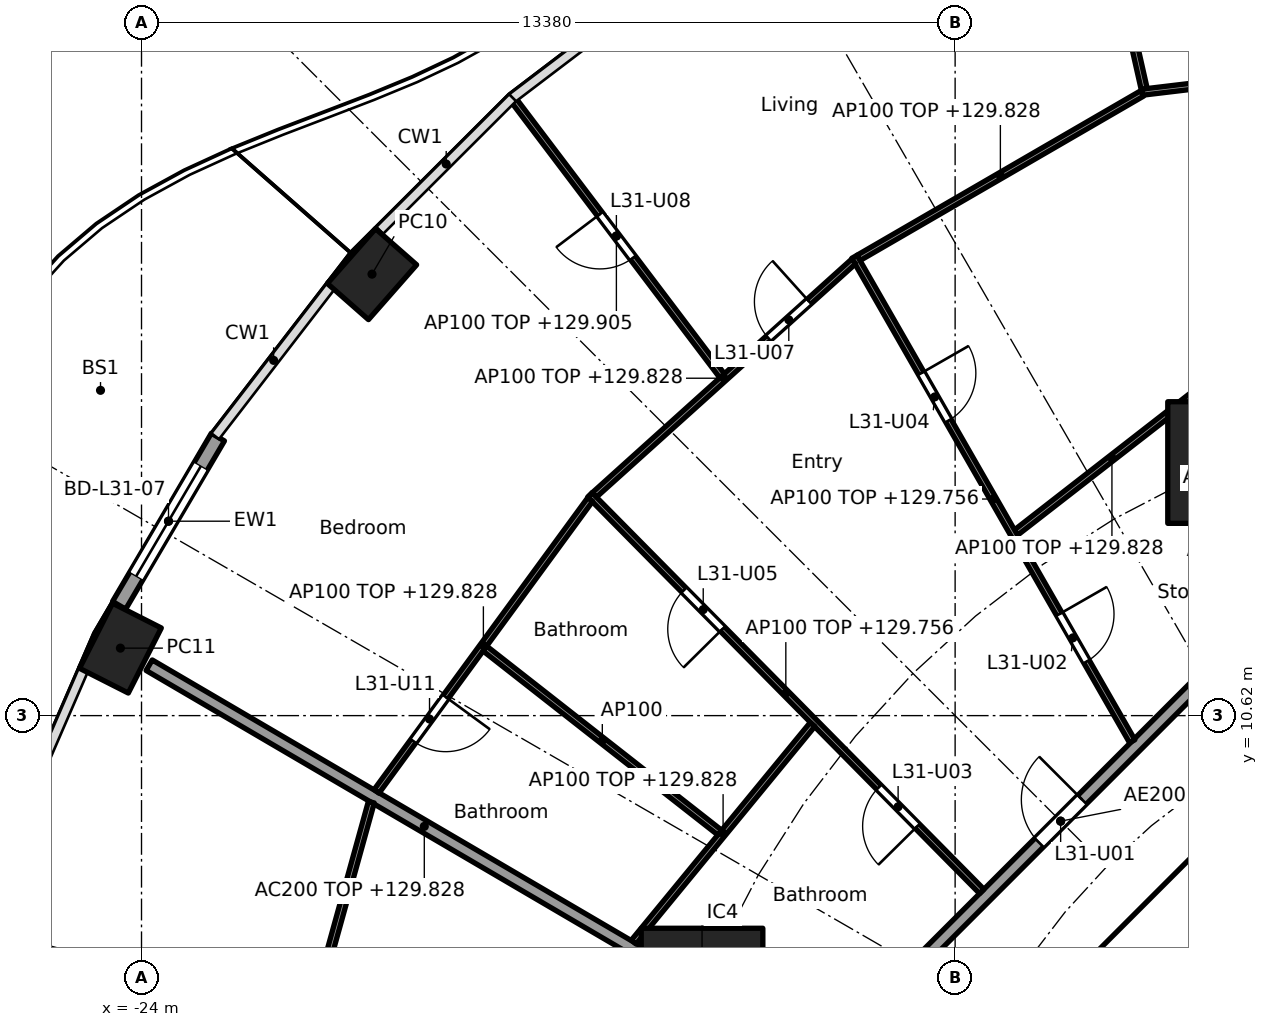
"""IFC4 building model, lengths in metres.
Left out: names, types, materials, properties, quantities, classifications, styles, units other than length and angle.
Written with IfcOpenShell. Run it as: python <this file> out.ifc"""

import sys

from ifc_helpers import new_model, si_unit, direction, frame, frame_2d, origin, origin_2d, place, context, subcontext, project, spatial, rectangle, hollow_rectangle, extrude, element, fill, save


model = new_model("IFC4")
c1 = context("Model", 3, precision=1e-05, world=origin(), true_north=direction((0.0, 1.0)))
c2 = subcontext(c1, "Body", "Model", "MODEL_VIEW")
j1 = project(units=[si_unit("LENGTHUNIT", "METRE"), si_unit("PLANEANGLEUNIT", "RADIAN")], contexts=[c1])
p1 = place(None, origin())
s1 = spatial("IfcSite", under=j1, at=p1, CompositionType="ELEMENT")
p2 = place(p1, origin())
s2 = spatial("IfcBuilding", under=s1, at=p2, CompositionType="ELEMENT")
p3 = place(p2, frame((0.0, 0.0, 127.0)))
s3 = spatial("IfcBuildingStorey", under=s2, at=p3, CompositionType="ELEMENT", Elevation=127.0)
for number, where, z_axis, x_axis in (
    (1, (-20.209, 17.88, 0.0), (0.0, 0.0, 1.0), (-0.66, -0.751, 0.0)),
    (2, (-24.347, 11.73, 0.0), (0.0, 0.0, 1.0), (-0.452, -0.892, 0.0)),
):
    element("IfcColumn", number, at=place(p3, frame(where, z_axis=z_axis, x_axis=x_axis)), inside=s3, PredefinedType="COLUMN", context=c2, shape_type="SweptSolid", body=[
        extrude(hollow_rectangle(XDim=1.2, YDim=0.9, WallThickness=0.04, at=origin_2d()), origin(), (0.0, 0.0, 1.0), 3.7),
    ])
for number, where, z_axis, x_axis in (
    (3, (-6.123, 14.782, 0.0), (0.0, 0.0, 1.0), (1.0, 0.0, 0.0)),
    (4, (-14.782, 6.123, 0.0), (0.0, 0.0, 1.0), (1.0, 0.0, 0.0)),
):
    element("IfcColumn", number, at=place(p3, frame(where, z_axis=z_axis, x_axis=x_axis)), inside=s3, PredefinedType="COLUMN", context=c2, shape_type="SweptSolid", body=[
        extrude(rectangle(XDim=2.0, YDim=2.0, at=origin_2d()), origin(), (0.0, 0.0, 1.0), 3.7),
    ])
p4 = place(p3, frame((-24.368, 12.434, 0.0), z_axis=(0.0, 0.0, 1.0), x_axis=(0.506314982873, 0.862348617508, 0.0)))
e5 = element("IfcWall", 5, at=p4, inside=s3, PredefinedType="SOLIDWALL", context=c2, shape_type="SweptSolid", body=[
    extrude(rectangle(XDim=3.208, YDim=0.25, at=frame_2d((1.604, 0.0))), origin(), (0.0, 0.0, 1.0), 3.44),
])
p5 = place(p4, frame((0.554, 0.0, 0.0)))
e6 = element("IfcOpeningElement", 6, at=p5, cuts=e5, PredefinedType="OPENING", context=c2, shape_type="SweptSolid", body=[
    extrude(rectangle(XDim=2.1, YDim=2.4, at=frame_2d((1.05, 1.2))), frame((0.0, 0.135, 0.0), z_axis=(0.0, -1.0, 0.0), x_axis=(1.0, 0.0, 0.0)), (0.0, 0.0, 1.0), 0.27),
])
p6 = place(p3, frame((-4.613, 9.988, 0.0), z_axis=(0.0, 0.0, 1.0), x_axis=(-0.707106781187, -0.707106781187, 0.0)))
e7 = element("IfcWall", 7, at=p6, inside=s3, PredefinedType="SHEAR", context=c2, shape_type="SweptSolid", body=[
    extrude(rectangle(XDim=7.602, YDim=0.6, at=frame_2d((3.801, 0.0))), origin(), (0.0, 0.0, 1.0), 3.44),
])
p7 = place(p6, frame((0.351, 0.0, 0.0)))
e8 = element("IfcOpeningElement", 8, at=p7, cuts=e7, PredefinedType="OPENING", context=c2, shape_type="SweptSolid", body=[
    extrude(rectangle(XDim=1.1, YDim=2.1, at=frame_2d((0.55, 1.05))), frame((0.0, 0.31, 0.0), z_axis=(0.0, -1.0, 0.0), x_axis=(1.0, 0.0, 0.0)), (0.0, 0.0, 1.0), 0.62),
])
p8 = place(p3, frame((-14.825, 6.148, 0.0), z_axis=(0.0, 0.0, 1.0), x_axis=(-0.862852031662, 0.505456597006, 0.0)))
e9 = element("IfcWall", 9, at=p8, inside=s3, PredefinedType="PARTITIONING", context=c2, shape_type="SweptSolid", body=[
    extrude(rectangle(XDim=10.487, YDim=0.2, at=frame_2d((5.244, 0.0))), origin(), (0.0, 0.0, 1.0), 2.828),
])
p9 = place(p3, frame((-5.275, 12.494, 0.0), z_axis=(0.0, 0.0, 1.0), x_axis=(-0.707106781187, -0.707106781187, 0.0)))
e10 = element("IfcWall", 10, at=p9, inside=s3, PredefinedType="PARTITIONING", context=c2, shape_type="SweptSolid", body=[
    extrude(rectangle(XDim=10.209, YDim=0.2, at=frame_2d((5.104, 0.0))), origin(), (0.0, 0.0, 1.0), 3.44),
])
p10 = place(p9, frame((4.604, 0.0, 0.0)))
e11 = element("IfcOpeningElement", 11, at=p10, cuts=e10, PredefinedType="OPENING", context=c2, shape_type="SweptSolid", body=[
    extrude(rectangle(XDim=1.0, YDim=2.1, at=frame_2d((0.5, 1.05))), frame((0.0, 0.11, 0.0), z_axis=(0.0, -1.0, 0.0), x_axis=(1.0, 0.0, 0.0)), (0.0, 0.0, 1.0), 0.22),
])
p11 = place(p3, frame((-1.825, 21.557, 0.0), z_axis=(0.0, 0.0, 1.0), x_axis=(-0.992915657947, -0.118821278412, 0.0)))
e12 = element("IfcWall", 12, at=p11, inside=s3, PredefinedType="PARTITIONING", context=c2, shape_type="SweptSolid", body=[
    extrude(rectangle(XDim=5.765, YDim=0.1, at=frame_2d((2.883, 0.0))), origin(), (0.0, 0.0, 1.0), 2.828),
])
p12 = place(p11, frame((2.408, 0.0, 0.0)))
e13 = element("IfcOpeningElement", 13, at=p12, cuts=e12, PredefinedType="OPENING", context=c2, shape_type="SweptSolid", body=[
    extrude(rectangle(XDim=0.9, YDim=2.1, at=frame_2d((0.45, 1.05))), frame((0.0, 0.06, 0.0), z_axis=(0.0, -1.0, 0.0), x_axis=(1.0, 0.0, 0.0)), (0.0, 0.0, 1.0), 0.12),
])
p13 = place(p3, frame((-6.463, 16.084, 0.0), z_axis=(0.0, 0.0, 1.0), x_axis=(-0.789457442969, -0.613805299538, 0.0)))
e14 = element("IfcWall", 14, at=p13, inside=s3, PredefinedType="PARTITIONING", context=c2, shape_type="SweptSolid", body=[
    extrude(rectangle(XDim=3.997, YDim=0.1, at=frame_2d((1.999, 0.0))), origin(), (0.0, 0.0, 1.0), 2.828),
])
p14 = place(p3, frame((-7.511, 20.927, 0.0), z_axis=(0.0, 0.0, 1.0), x_axis=(-0.220337559031, 0.975423682345, 0.0)))
e15 = element("IfcWall", 15, at=p14, inside=s3, PredefinedType="PARTITIONING", context=c2, shape_type="SweptSolid", body=[
    extrude(rectangle(XDim=4.202, YDim=0.1, at=frame_2d((2.101, 0.0))), origin(), (0.0, 0.0, 1.0), 2.828),
])
p15 = place(p3, frame((-7.543, 20.853, 0.0), z_axis=(0.0, 0.0, 1.0), x_axis=(-0.865086194899, -0.501623240485, 0.0)))
e16 = element("IfcWall", 16, at=p15, inside=s3, PredefinedType="PARTITIONING", context=c2, shape_type="SweptSolid", body=[
    extrude(rectangle(XDim=5.393, YDim=0.1, at=frame_2d((2.697, 0.0))), origin(), (0.0, 0.0, 1.0), 2.828),
])
p16 = place(p3, frame((-7.708, 10.198, 0.0), z_axis=(0.0, 0.0, 1.0), x_axis=(-0.497449462689, 0.867492957937, 0.0)))
e17 = element("IfcWall", 17, at=p16, inside=s3, PredefinedType="PARTITIONING", context=c2, shape_type="SweptSolid", body=[
    extrude(rectangle(XDim=9.185, YDim=0.1, at=frame_2d((4.592, 0.0))), origin(), (0.0, 0.0, 1.0), 2.756),
])
p17 = place(p16, frame((1.511, 0.0, 0.0)))
e18 = element("IfcOpeningElement", 18, at=p17, cuts=e17, PredefinedType="OPENING", context=c2, shape_type="SweptSolid", body=[
    extrude(rectangle(XDim=0.9, YDim=2.1, at=frame_2d((0.45, 1.05))), frame((0.0, 0.06, 0.0), z_axis=(0.0, -1.0, 0.0), x_axis=(1.0, 0.0, 0.0)), (0.0, 0.0, 1.0), 0.12),
])
p18 = place(p16, frame((6.078, 0.0, 0.0)))
e19 = element("IfcOpeningElement", 19, at=p18, cuts=e17, PredefinedType="OPENING", context=c2, shape_type="SweptSolid", body=[
    extrude(rectangle(XDim=0.9, YDim=2.1, at=frame_2d((0.45, 1.05))), frame((0.0, 0.06, 0.0), z_axis=(0.0, -1.0, 0.0), x_axis=(1.0, 0.0, 0.0)), (0.0, 0.0, 1.0), 0.12),
])
p19 = place(p3, frame((-12.289, 18.089, 0.0), z_axis=(0.0, 0.0, 1.0), x_axis=(-0.743146066164, -0.669129228435, 0.0)))
e20 = element("IfcWall", 20, at=p19, inside=s3, PredefinedType="PARTITIONING", context=c2, shape_type="SweptSolid", body=[
    extrude(rectangle(XDim=5.739, YDim=0.1, at=frame_2d((2.87, 0.0))), origin(), (0.0, 0.0, 1.0), 2.828),
])
p20 = place(p19, frame((0.985, 0.0, 0.0)))
e21 = element("IfcOpeningElement", 21, at=p20, cuts=e20, PredefinedType="OPENING", context=c2, shape_type="SweptSolid", body=[
    extrude(rectangle(XDim=0.9, YDim=2.1, at=frame_2d((0.45, 1.05))), frame((0.0, 0.06, 0.0), z_axis=(0.0, -1.0, 0.0), x_axis=(1.0, 0.0, 0.0)), (0.0, 0.0, 1.0), 0.12),
])
p21 = place(p3, frame((-14.452, 16.208, 0.0), z_axis=(0.0, 0.0, 1.0), x_axis=(-0.603267974074, 0.797538557975, 0.0)))
e22 = element("IfcWall", 22, at=p21, inside=s3, PredefinedType="PARTITIONING", context=c2, shape_type="SweptSolid", body=[
    extrude(rectangle(XDim=5.764, YDim=0.1, at=frame_2d((2.882, 0.0))), origin(), (0.0, 0.0, 1.0), 2.905),
])
p22 = place(p21, frame((2.432, 0.0, 0.0)))
e23 = element("IfcOpeningElement", 23, at=p22, cuts=e22, PredefinedType="OPENING", context=c2, shape_type="SweptSolid", body=[
    extrude(rectangle(XDim=0.9, YDim=2.1, at=frame_2d((0.45, 1.05))), frame((0.0, 0.06, 0.0), z_axis=(0.0, -1.0, 0.0), x_axis=(1.0, 0.0, 0.0)), (0.0, 0.0, 1.0), 0.12),
])
p23 = place(p3, frame((-10.182, 7.729, 0.0), z_axis=(0.0, 0.0, 1.0), x_axis=(-0.702927211734, 0.711261790766, 0.0)))
e24 = element("IfcWall", 24, at=p23, inside=s3, PredefinedType="PARTITIONING", context=c2, shape_type="SweptSolid", body=[
    extrude(rectangle(XDim=9.168, YDim=0.1, at=frame_2d((4.584, 0.0))), origin(), (0.0, 0.0, 1.0), 2.756),
])
p24 = place(p23, frame((1.507, 0.0, 0.0)))
e25 = element("IfcOpeningElement", 25, at=p24, cuts=e24, PredefinedType="OPENING", context=c2, shape_type="SweptSolid", body=[
    extrude(rectangle(XDim=0.9, YDim=2.1, at=frame_2d((0.45, 1.05))), frame((0.0, 0.06, 0.0), z_axis=(0.0, -1.0, 0.0), x_axis=(1.0, 0.0, 0.0)), (0.0, 0.0, 1.0), 0.12),
])
p25 = place(p23, frame((6.067, 0.0, 0.0)))
e26 = element("IfcOpeningElement", 26, at=p25, cuts=e24, PredefinedType="OPENING", context=c2, shape_type="SweptSolid", body=[
    extrude(rectangle(XDim=0.9, YDim=2.1, at=frame_2d((0.45, 1.05))), frame((0.0, 0.06, 0.0), z_axis=(0.0, -1.0, 0.0), x_axis=(1.0, 0.0, 0.0)), (0.0, 0.0, 1.0), 0.12),
])
p26 = place(p3, frame((-12.965, 10.475, 0.0), z_axis=(0.0, 0.0, 1.0), x_axis=(-0.634943961338, -0.772558195841, 0.0)))
e27 = element("IfcWall", 27, at=p26, inside=s3, PredefinedType="PARTITIONING", context=c2, shape_type="SweptSolid", body=[
    extrude(rectangle(XDim=4.632, YDim=0.1, at=frame_2d((2.316, 0.0))), origin(), (0.0, 0.0, 1.0), 2.828),
])
p27 = place(p3, frame((-16.621, 14.174, 0.0), z_axis=(0.0, 0.0, 1.0), x_axis=(-0.590674917338, -0.806909624449, 0.0)))
e28 = element("IfcWall", 28, at=p27, inside=s3, PredefinedType="PARTITIONING", context=c2, shape_type="SweptSolid", body=[
    extrude(rectangle(XDim=5.949, YDim=0.1, at=frame_2d((2.975, 0.0))), origin(), (0.0, 0.0, 1.0), 2.828),
])
p28 = place(p27, frame((4.024, 0.0, 0.0)))
e29 = element("IfcOpeningElement", 29, at=p28, cuts=e28, PredefinedType="OPENING", context=c2, shape_type="SweptSolid", body=[
    extrude(rectangle(XDim=0.9, YDim=2.1, at=frame_2d((0.45, 1.05))), frame((0.0, 0.06, 0.0), z_axis=(0.0, -1.0, 0.0), x_axis=(1.0, 0.0, 0.0)), (0.0, 0.0, 1.0), 0.12),
])
p29 = place(p3, frame((-14.491, 8.697, 0.0), z_axis=(0.0, 0.0, 1.0), x_axis=(-0.787139479951, 0.616775031193, 0.0)))
e30 = element("IfcWall", 30, at=p29, inside=s3, PredefinedType="PARTITIONING", context=c2, shape_type="SweptSolid", body=[
    extrude(rectangle(XDim=4.907, YDim=0.1, at=frame_2d((2.453, 0.0))), origin(), (0.0, 0.0, 1.0), 3.44),
])
p30 = place(p3, frame((-20.221, 9.197, 0.0), z_axis=(0.0, 0.0, 1.0), x_axis=(-0.267398009191, -0.963586168789, 0.0)))
e31 = element("IfcWall", 31, at=p30, inside=s3, PredefinedType="PARTITIONING", context=c2, shape_type="SweptSolid", body=[
    extrude(rectangle(XDim=5.788, YDim=0.1, at=frame_2d((2.894, 0.0))), origin(), (0.0, 0.0, 1.0), 2.828),
])
p31 = place(p5, origin())
e32 = element("IfcDoor", 32, at=p31, inside=s3, OperationType="SLIDING_TO_LEFT", PredefinedType="DOOR", context=c2, shape_type="SweptSolid", body=[
    extrude(rectangle(XDim=2.1, YDim=2.4, at=frame_2d((1.05, 1.2))), frame((0.0, 0.025, 0.0), z_axis=(0.0, -1.0, 0.0), x_axis=(1.0, 0.0, 0.0)), (0.0, 0.0, 1.0), 0.05),
])
fill(e6, e32)
p32 = place(p10, frame((1.0, 0.0, 0.0), x_axis=(-1.0, 0.0, 0.0)))
e33 = element("IfcDoor", 33, at=p32, inside=s3, OperationType="SINGLE_SWING_RIGHT", PredefinedType="DOOR", context=c2, shape_type="SweptSolid", body=[
    extrude(rectangle(XDim=1.0, YDim=2.1, at=frame_2d((0.5, 1.05))), frame((0.0, 0.025, 0.0), z_axis=(0.0, -1.0, 0.0), x_axis=(1.0, 0.0, 0.0)), (0.0, 0.0, 1.0), 0.05),
])
fill(e11, e33)
p33 = place(p17, frame((0.9, 0.0, 0.0), x_axis=(-1.0, 0.0, 0.0)))
e34 = element("IfcDoor", 34, at=p33, inside=s3, OperationType="SINGLE_SWING_LEFT", PredefinedType="DOOR", context=c2, shape_type="SweptSolid", body=[
    extrude(rectangle(XDim=0.9, YDim=2.1, at=frame_2d((0.45, 1.05))), frame((0.0, 0.025, 0.0), z_axis=(0.0, -1.0, 0.0), x_axis=(1.0, 0.0, 0.0)), (0.0, 0.0, 1.0), 0.05),
])
fill(e18, e34)
p34 = place(p24, origin())
e35 = element("IfcDoor", 35, at=p34, inside=s3, OperationType="SINGLE_SWING_LEFT", PredefinedType="DOOR", context=c2, shape_type="SweptSolid", body=[
    extrude(rectangle(XDim=0.9, YDim=2.1, at=frame_2d((0.45, 1.05))), frame((0.0, 0.025, 0.0), z_axis=(0.0, -1.0, 0.0), x_axis=(1.0, 0.0, 0.0)), (0.0, 0.0, 1.0), 0.05),
])
fill(e25, e35)
p35 = place(p18, frame((0.9, 0.0, 0.0), x_axis=(-1.0, 0.0, 0.0)))
e36 = element("IfcDoor", 36, at=p35, inside=s3, OperationType="SINGLE_SWING_LEFT", PredefinedType="DOOR", context=c2, shape_type="SweptSolid", body=[
    extrude(rectangle(XDim=0.9, YDim=2.1, at=frame_2d((0.45, 1.05))), frame((0.0, 0.025, 0.0), z_axis=(0.0, -1.0, 0.0), x_axis=(1.0, 0.0, 0.0)), (0.0, 0.0, 1.0), 0.05),
])
fill(e19, e36)
p36 = place(p25, origin())
e37 = element("IfcDoor", 37, at=p36, inside=s3, OperationType="SINGLE_SWING_LEFT", PredefinedType="DOOR", context=c2, shape_type="SweptSolid", body=[
    extrude(rectangle(XDim=0.9, YDim=2.1, at=frame_2d((0.45, 1.05))), frame((0.0, 0.025, 0.0), z_axis=(0.0, -1.0, 0.0), x_axis=(1.0, 0.0, 0.0)), (0.0, 0.0, 1.0), 0.05),
])
fill(e26, e37)
p37 = place(p20, frame((0.9, 0.0, 0.0), x_axis=(-1.0, 0.0, 0.0)))
e38 = element("IfcDoor", 38, at=p37, inside=s3, OperationType="SINGLE_SWING_RIGHT", PredefinedType="DOOR", context=c2, shape_type="SweptSolid", body=[
    extrude(rectangle(XDim=0.9, YDim=2.1, at=frame_2d((0.45, 1.05))), frame((0.0, 0.025, 0.0), z_axis=(0.0, -1.0, 0.0), x_axis=(1.0, 0.0, 0.0)), (0.0, 0.0, 1.0), 0.05),
])
fill(e21, e38)
p38 = place(p22, origin())
e39 = element("IfcDoor", 39, at=p38, inside=s3, OperationType="SINGLE_SWING_RIGHT", PredefinedType="DOOR", context=c2, shape_type="SweptSolid", body=[
    extrude(rectangle(XDim=0.9, YDim=2.1, at=frame_2d((0.45, 1.05))), frame((0.0, 0.025, 0.0), z_axis=(0.0, -1.0, 0.0), x_axis=(1.0, 0.0, 0.0)), (0.0, 0.0, 1.0), 0.05),
])
fill(e23, e39)
p39 = place(p28, origin())
e40 = element("IfcDoor", 40, at=p39, inside=s3, OperationType="SINGLE_SWING_LEFT", PredefinedType="DOOR", context=c2, shape_type="SweptSolid", body=[
    extrude(rectangle(XDim=0.9, YDim=2.1, at=frame_2d((0.45, 1.05))), frame((0.0, 0.025, 0.0), z_axis=(0.0, -1.0, 0.0), x_axis=(1.0, 0.0, 0.0)), (0.0, 0.0, 1.0), 0.05),
])
fill(e29, e40)
save(model, sys.argv[1])
